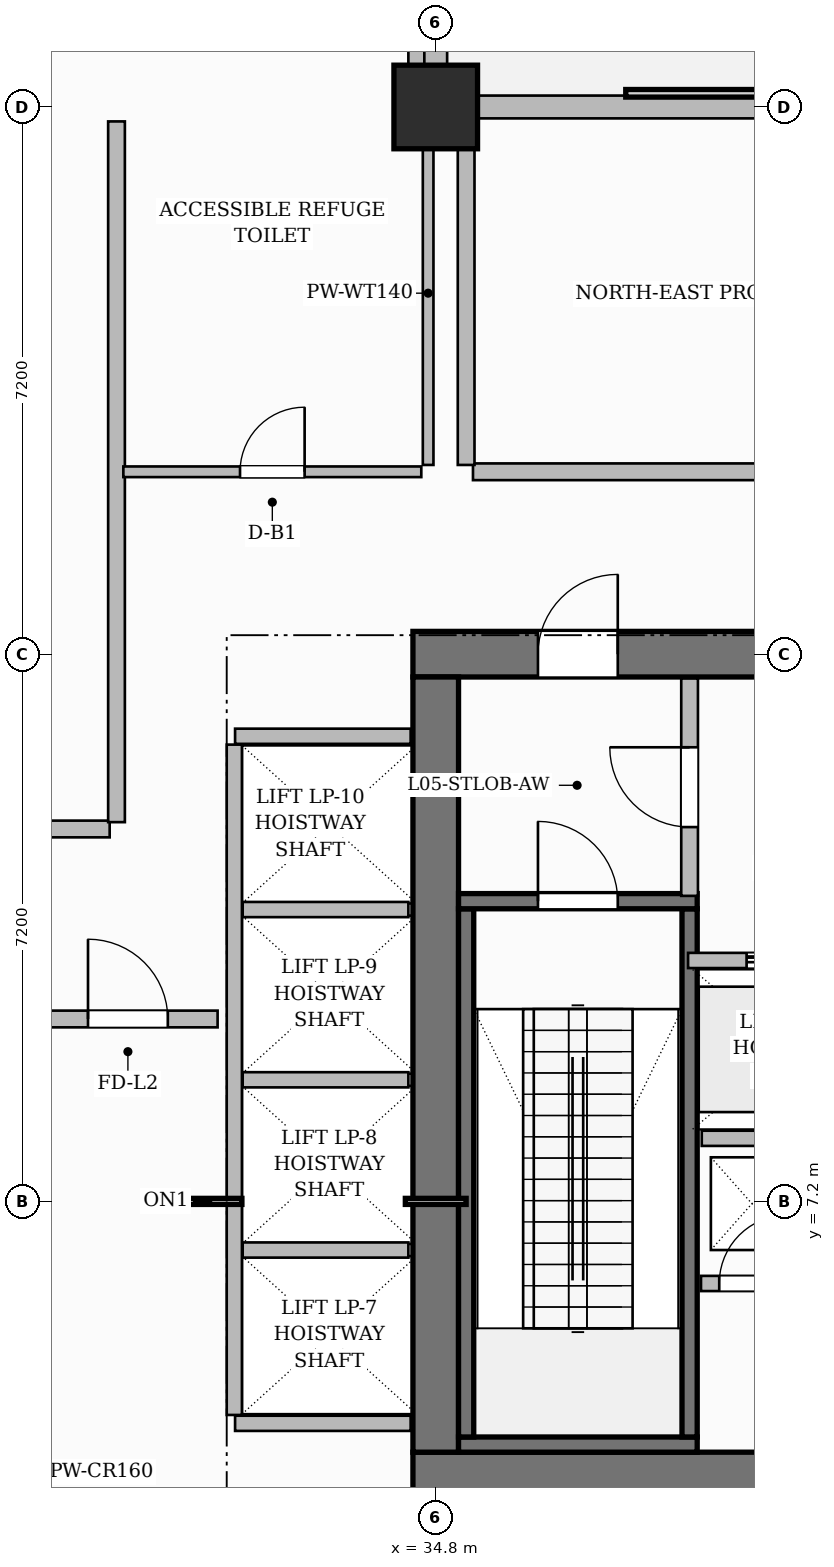
"""IFC4 building model, lengths in metres.
Left out: names, types, materials, properties, quantities, classifications, styles, units other than length and angle.
Written with IfcOpenShell. Run it as: python <this file> out.ifc"""

import sys

from ifc_helpers import new_model, si_unit, direction, frame, frame_2d, origin, origin_2d, place, context, subcontext, project, spatial, rectangle, extrude, source, transform, mapped, element, fill, save


model = new_model("IFC4")
c1 = context("Model", 3, precision=1e-05, world=origin(), true_north=direction((0.0, 1.0)))
c2 = subcontext(c1, "Body", "Model", "MODEL_VIEW")
j1 = project(units=[si_unit("LENGTHUNIT", "METRE"), si_unit("PLANEANGLEUNIT", "RADIAN")], contexts=[c1])
p1 = place(None, origin())
s1 = spatial("IfcSite", under=j1, at=p1, CompositionType="ELEMENT")
p2 = place(p1, origin())
s2 = spatial("IfcBuilding", under=s1, at=p2, CompositionType="ELEMENT")
p3 = place(p2, frame((0.0, 0.0, 27.0)))
s3 = spatial("IfcBuildingStorey", under=s2, at=p3, CompositionType="ELEMENT", Elevation=27.0)
p4 = place(p3, frame((34.5, 3.6, 0.0), z_axis=(0.0, 0.0, 1.0), x_axis=(1.0, 0.0, 0.0)))
e1 = element("IfcWall", 1, at=p4, inside=s3, PredefinedType="SHEAR", context=c2, shape_type="SweptSolid", body=[
    extrude(rectangle(XDim=15.6, YDim=0.6, at=frame_2d((7.8, 0.0))), origin(), (0.0, 0.0, 1.0), 5.4),
])
p5 = place(p4, frame((4.85, 0.0, 0.0)))
e2 = element("IfcOpeningElement", 2, at=p5, cuts=e1, PredefinedType="OPENING", context=c2, shape_type="SweptSolid", body=[
    extrude(rectangle(XDim=0.9, YDim=2.1, at=frame_2d((0.45, 1.05))), frame((0.0, 0.31, 0.0), z_axis=(0.0, -1.0, 0.0), x_axis=(1.0, 0.0, 0.0)), (0.0, 0.0, 1.0), 0.62),
])
p6 = place(p4, frame((7.27, 0.0, 0.0)))
e3 = element("IfcOpeningElement", 3, at=p6, cuts=e1, PredefinedType="OPENING", context=c2, shape_type="SweptSolid", body=[
    extrude(rectangle(XDim=0.9, YDim=2.1, at=frame_2d((0.45, 1.05))), frame((0.0, 0.31, 0.0), z_axis=(0.0, -1.0, 0.0), x_axis=(1.0, 0.0, 0.0)), (0.0, 0.0, 1.0), 0.62),
])
p7 = place(p3, frame((34.5, 14.4, 0.0), z_axis=(0.0, 0.0, 1.0), x_axis=(1.0, 0.0, 0.0)))
e4 = element("IfcWall", 4, at=p7, inside=s3, PredefinedType="SHEAR", context=c2, shape_type="SweptSolid", body=[
    extrude(rectangle(XDim=15.6, YDim=0.6, at=frame_2d((7.8, 0.0))), origin(), (0.0, 0.0, 1.0), 5.4),
])
p8 = place(p7, frame((5.43, 0.0, 0.0)))
e5 = element("IfcOpeningElement", 5, at=p8, cuts=e4, PredefinedType="OPENING", context=c2, shape_type="SweptSolid", body=[
    extrude(rectangle(XDim=1.5, YDim=2.2, at=frame_2d((0.75, 1.1))), frame((0.0, 0.31, 0.0), z_axis=(0.0, -1.0, 0.0), x_axis=(1.0, 0.0, 0.0)), (0.0, 0.0, 1.0), 0.62),
])
p9 = place(p7, frame((1.645, 0.0, 0.0)))
e6 = element("IfcOpeningElement", 6, at=p9, cuts=e4, PredefinedType="OPENING", context=c2, shape_type="SweptSolid", body=[
    extrude(rectangle(XDim=1.05, YDim=2.15, at=frame_2d((0.525, 1.075))), frame((0.0, 0.31, 0.0), z_axis=(0.0, -1.0, 0.0), x_axis=(1.0, 0.0, 0.0)), (0.0, 0.0, 1.0), 0.62),
])
p10 = place(p7, frame((11.275, 0.0, 0.0)))
e7 = element("IfcOpeningElement", 7, at=p10, cuts=e4, PredefinedType="OPENING", context=c2, shape_type="SweptSolid", body=[
    extrude(rectangle(XDim=1.05, YDim=2.15, at=frame_2d((0.525, 1.075))), frame((0.0, 0.31, 0.0), z_axis=(0.0, -1.0, 0.0), x_axis=(1.0, 0.0, 0.0)), (0.0, 0.0, 1.0), 0.62),
])
p11 = place(p3, frame((34.8, 3.9, 0.0), z_axis=(0.0, 0.0, 1.0), x_axis=(0.0, 1.0, 0.0)))
e8 = element("IfcWall", 8, at=p11, inside=s3, PredefinedType="SHEAR", context=c2, shape_type="SweptSolid", body=[
    extrude(rectangle(XDim=10.2, YDim=0.6, at=frame_2d((5.1, 0.0))), origin(), (0.0, 0.0, 1.0), 5.4),
])
m1 = source(origin(), c2, "Body", "SweptSolid", [
    extrude(rectangle(XDim=1.1, YDim=1.1, at=origin_2d()), origin(), (0.0, 0.0, 1.0), 5.4),
])
p12 = place(p3, frame((34.8, 21.6, 0.0), z_axis=(0.0, 0.0, 1.0), x_axis=(1.0, 0.0, 0.0)))
e9 = element("IfcColumn", 9, at=p12, inside=s3, PredefinedType="COLUMN", context=c2, shape_type="MappedRepresentation", body=[
    mapped(m1, transform((0.0, 0.0, 0.0), scale=1.0)),
])
p13 = place(p3, frame((35.1, 4.0, 0.0), z_axis=(0.0, 0.0, 1.0), x_axis=(1.0, 0.0, 0.0)))
e10 = element("IfcWall", 10, at=p13, inside=s3, PredefinedType="SHEAR", context=c2, shape_type="SweptSolid", body=[
    extrude(rectangle(XDim=3.14, YDim=0.2, at=frame_2d((1.57, 0.0))), origin(), (0.0, 0.0, 1.0), 5.4),
])
for number, where, z_axis, x_axis in (
    (11, (35.2, 4.1, 0.0), (0.0, 0.0, 1.0), (0.0, 1.0, 0.0)),
    (12, (38.14, 4.1, 0.0), (0.0, 0.0, 1.0), (0.0, 1.0, 0.0)),
):
    element("IfcWall", number, at=place(p3, frame(where, z_axis=z_axis, x_axis=x_axis)), inside=s3, PredefinedType="SHEAR", context=c2, shape_type="SweptSolid", body=[
        extrude(rectangle(XDim=6.95, YDim=0.2, at=frame_2d((3.475, 0.0))), origin(), (0.0, 0.0, 1.0), 5.4),
    ])
p14 = place(p3, frame((35.1, 11.15, 0.0), z_axis=(0.0, 0.0, 1.0), x_axis=(1.0, 0.0, 0.0)))
e13 = element("IfcWall", 13, at=p14, inside=s3, PredefinedType="SHEAR", context=c2, shape_type="SweptSolid", body=[
    extrude(rectangle(XDim=3.14, YDim=0.2, at=frame_2d((1.57, 0.0))), origin(), (0.0, 0.0, 1.0), 5.4),
])
p15 = place(p14, frame((1.045, 0.0, 0.0)))
e14 = element("IfcOpeningElement", 14, at=p15, cuts=e13, PredefinedType="OPENING", context=c2, shape_type="SweptSolid", body=[
    extrude(rectangle(XDim=1.05, YDim=2.2, at=frame_2d((0.525, 1.1))), frame((0.0, 0.11, 0.0), z_axis=(0.0, -1.0, 0.0), x_axis=(1.0, 0.0, 0.0)), (0.0, 0.0, 1.0), 0.22),
])
p16 = place(p3, frame((38.3, 8.03, 0.0), z_axis=(0.0, 0.0, 1.0), x_axis=(1.0, 0.0, 0.0)))
e15 = element("IfcWall", 15, at=p16, inside=s3, PredefinedType="PARTITIONING", context=c2, shape_type="SweptSolid", body=[
    extrude(rectangle(XDim=4.74, YDim=0.2, at=frame_2d((2.37, 0.0))), origin(), (0.0, 0.0, 1.0), 5.15),
])
p17 = place(p3, frame((38.14, 11.22, 0.0), z_axis=(0.0, 0.0, 1.0), x_axis=(0.0, 1.0, 0.0)))
e16 = element("IfcWall", 16, at=p17, inside=s3, PredefinedType="PARTITIONING", context=c2, shape_type="SweptSolid", body=[
    extrude(rectangle(XDim=2.86, YDim=0.22, at=frame_2d((1.43, 0.0))), origin(), (0.0, 0.0, 1.0), 5.15),
])
p18 = place(p17, frame((0.905, 0.0, 0.0)))
e17 = element("IfcOpeningElement", 17, at=p18, cuts=e16, PredefinedType="OPENING", context=c2, shape_type="SweptSolid", body=[
    extrude(rectangle(XDim=1.05, YDim=2.15, at=frame_2d((0.525, 1.075))), frame((0.0, 0.12, 0.0), z_axis=(0.0, -1.0, 0.0), x_axis=(1.0, 0.0, 0.0)), (0.0, 0.0, 1.0), 0.24),
])
p19 = place(p3, frame((38.29, 6.12, 0.0), z_axis=(0.0, 0.0, 1.0), x_axis=(1.0, 0.0, 0.0)))
e18 = element("IfcWall", 18, at=p19, inside=s3, PredefinedType="PARTITIONING", context=c2, shape_type="SweptSolid", body=[
    extrude(rectangle(XDim=1.38, YDim=0.2, at=frame_2d((0.69, 0.0))), origin(), (0.0, 0.0, 1.0), 5.15),
])
p20 = place(p19, frame((0.24, 0.0, 0.0)))
e19 = element("IfcOpeningElement", 19, at=p20, cuts=e18, PredefinedType="OPENING", context=c2, shape_type="SweptSolid", body=[
    extrude(rectangle(XDim=0.9, YDim=2.1, at=frame_2d((0.45, 1.05))), frame((0.0, 0.11, 0.0), z_axis=(0.0, -1.0, 0.0), x_axis=(1.0, 0.0, 0.0)), (0.0, 0.0, 1.0), 0.22),
])
for number, where, z_axis, x_axis in (
    (20, (32.16, 4.28, 0.0), (0.0, 0.0, 1.0), (1.0, 0.0, 0.0)),
    (21, (32.16, 13.32, 0.0), (0.0, 0.0, 1.0), (1.0, 0.0, 0.0)),
):
    element("IfcWall", number, at=place(p3, frame(where, z_axis=z_axis, x_axis=x_axis)), inside=s3, PredefinedType="PARTITIONING", context=c2, shape_type="SweptSolid", body=[
        extrude(rectangle(XDim=2.31, YDim=0.2, at=frame_2d((1.155, 0.0))), origin(), (0.0, 0.0, 1.0), 5.15),
    ])
p21 = place(p3, frame((32.15, 4.39, 0.0), z_axis=(0.0, 0.0, 1.0), x_axis=(0.0, 1.0, 0.0)))
e22 = element("IfcWall", 22, at=p21, inside=s3, PredefinedType="PARTITIONING", context=c2, shape_type="SweptSolid", body=[
    extrude(rectangle(XDim=8.82, YDim=0.2, at=frame_2d((4.41, 0.0))), origin(), (0.0, 0.0, 1.0), 5.15),
])
for number, where, z_axis, x_axis in (
    (23, (32.26, 6.56, 0.0), (0.0, 0.0, 1.0), (1.0, 0.0, 0.0)),
    (24, (32.26, 8.8, 0.0), (0.0, 0.0, 1.0), (1.0, 0.0, 0.0)),
    (25, (32.26, 11.04, 0.0), (0.0, 0.0, 1.0), (1.0, 0.0, 0.0)),
):
    element("IfcWall", number, at=place(p3, frame(where, z_axis=z_axis, x_axis=x_axis)), inside=s3, PredefinedType="PARTITIONING", context=c2, shape_type="SweptSolid", body=[
        extrude(rectangle(XDim=2.18, YDim=0.2, at=frame_2d((1.09, 0.0))), origin(), (0.0, 0.0, 1.0), 5.15),
    ])
p22 = place(p3, frame((14.558, 9.6, 0.0), z_axis=(0.0, 0.0, 1.0), x_axis=(1.0, 0.0, 0.0)))
e26 = element("IfcWall", 26, at=p22, inside=s3, PredefinedType="PARTITIONING", context=c2, shape_type="SweptSolid", body=[
    extrude(rectangle(XDim=17.372, YDim=0.22, at=frame_2d((8.686, 0.0))), origin(), (0.0, 0.0, 1.0), 5.15),
])
p23 = place(p22, frame((15.667, 0.0, 0.0)))
e27 = element("IfcOpeningElement", 27, at=p23, cuts=e26, PredefinedType="OPENING", context=c2, shape_type="SweptSolid", body=[
    extrude(rectangle(XDim=1.05, YDim=2.15, at=frame_2d((0.525, 1.075))), frame((0.0, 0.12, 0.0), z_axis=(0.0, -1.0, 0.0), x_axis=(1.0, 0.0, 0.0)), (0.0, 0.0, 1.0), 0.24),
])
p24 = place(p22, frame((8.192, 0.0, 0.0)))
e28 = element("IfcOpeningElement", 28, at=p24, cuts=e26, PredefinedType="OPENING", context=c2, shape_type="SweptSolid", body=[
    extrude(rectangle(XDim=1.5, YDim=2.2, at=frame_2d((0.75, 1.1))), frame((0.0, 0.12, 0.0), z_axis=(0.0, -1.0, 0.0), x_axis=(1.0, 0.0, 0.0)), (0.0, 0.0, 1.0), 0.24),
])
p25 = place(p3, frame((18.09, 12.1, 0.0), z_axis=(0.0, 0.0, 1.0), x_axis=(1.0, 0.0, 0.0)))
e29 = element("IfcWall", 29, at=p25, inside=s3, PredefinedType="PARTITIONING", context=c2, shape_type="SweptSolid", body=[
    extrude(rectangle(XDim=12.42, YDim=0.22, at=frame_2d((6.21, 0.0))), origin(), (0.0, 0.0, 1.0), 5.15),
])
p26 = place(p25, frame((1.56, 0.0, 0.0)))
e30 = element("IfcOpeningElement", 30, at=p26, cuts=e29, PredefinedType="OPENING", context=c2, shape_type="SweptSolid", body=[
    extrude(rectangle(XDim=1.5, YDim=2.2, at=frame_2d((0.75, 1.1))), frame((0.0, 0.12, 0.0), z_axis=(0.0, -1.0, 0.0), x_axis=(1.0, 0.0, 0.0)), (0.0, 0.0, 1.0), 0.24),
])
p27 = place(p25, frame((8.16, 0.0, 0.0)))
e31 = element("IfcOpeningElement", 31, at=p27, cuts=e29, PredefinedType="OPENING", context=c2, shape_type="SweptSolid", body=[
    extrude(rectangle(XDim=1.5, YDim=2.2, at=frame_2d((0.75, 1.1))), frame((0.0, 0.12, 0.0), z_axis=(0.0, -1.0, 0.0), x_axis=(1.0, 0.0, 0.0)), (0.0, 0.0, 1.0), 0.24),
])
p28 = place(p3, frame((30.6, 12.19, 0.0), z_axis=(0.0, 0.0, 1.0), x_axis=(0.0, 1.0, 0.0)))
e32 = element("IfcWall", 32, at=p28, inside=s3, PredefinedType="PARTITIONING", context=c2, shape_type="SweptSolid", body=[
    extrude(rectangle(XDim=9.22, YDim=0.22, at=frame_2d((4.61, 0.0))), origin(), (0.0, 0.0, 1.0), 5.15),
])
p29 = place(p3, frame((30.69, 16.8, 0.0), z_axis=(0.0, 0.0, 1.0), x_axis=(1.0, 0.0, 0.0)))
e33 = element("IfcWall", 33, at=p29, inside=s3, PredefinedType="PARTITIONING", context=c2, shape_type="SweptSolid", body=[
    extrude(rectangle(XDim=3.92, YDim=0.14, at=frame_2d((1.96, 0.0))), origin(), (0.0, 0.0, 1.0), 5.15),
])
p30 = place(p29, frame((1.535, 0.0, 0.0)))
e34 = element("IfcOpeningElement", 34, at=p30, cuts=e33, PredefinedType="OPENING", context=c2, shape_type="SweptSolid", body=[
    extrude(rectangle(XDim=0.85, YDim=2.1, at=frame_2d((0.425, 1.05))), frame((0.0, 0.08, 0.0), z_axis=(0.0, -1.0, 0.0), x_axis=(1.0, 0.0, 0.0)), (0.0, 0.0, 1.0), 0.16),
])
p31 = place(p3, frame((34.7, 16.89, 0.0), z_axis=(0.0, 0.0, 1.0), x_axis=(0.0, 1.0, 0.0)))
e35 = element("IfcWall", 35, at=p31, inside=s3, PredefinedType="PARTITIONING", context=c2, shape_type="SweptSolid", body=[
    extrude(rectangle(XDim=4.52, YDim=0.14, at=frame_2d((2.26, 0.0))), origin(), (0.0, 0.0, 1.0), 4.485),
])
p32 = place(p3, frame((35.29, 16.8, 0.0), z_axis=(0.0, 0.0, 1.0), x_axis=(1.0, 0.0, 0.0)))
e36 = element("IfcWall", 36, at=p32, inside=s3, PredefinedType="PARTITIONING", context=c2, shape_type="SweptSolid", body=[
    extrude(rectangle(XDim=14.22, YDim=0.22, at=frame_2d((7.11, 0.0))), origin(), (0.0, 0.0, 1.0), 5.15),
])
p33 = place(p32, frame((4.76, 0.0, 0.0)))
e37 = element("IfcOpeningElement", 37, at=p33, cuts=e36, PredefinedType="OPENING", context=c2, shape_type="SweptSolid", body=[
    extrude(rectangle(XDim=1.5, YDim=2.2, at=frame_2d((0.75, 1.1))), frame((0.0, 0.12, 0.0), z_axis=(0.0, -1.0, 0.0), x_axis=(1.0, 0.0, 0.0)), (0.0, 0.0, 1.0), 0.24),
])
p34 = place(p3, frame((35.2, 16.89, 0.0), z_axis=(0.0, 0.0, 1.0), x_axis=(0.0, 1.0, 0.0)))
e38 = element("IfcWall", 38, at=p34, inside=s3, PredefinedType="PARTITIONING", context=c2, shape_type="SweptSolid", body=[
    extrude(rectangle(XDim=4.52, YDim=0.22, at=frame_2d((2.26, 0.0))), origin(), (0.0, 0.0, 1.0), 5.15),
])
p35 = place(p3, frame((34.55, 21.69, 0.0), z_axis=(0.0, 0.0, 1.0), x_axis=(0.0, 1.0, 0.0)))
e39 = element("IfcWall", 39, at=p35, inside=s3, PredefinedType="PARTITIONING", context=c2, shape_type="SweptSolid", body=[
    extrude(rectangle(XDim=10.47, YDim=0.22, at=frame_2d((5.235, 0.0))), origin(), (0.0, 0.0, 1.0), 4.485),
])
p36 = place(p3, frame((38.12, 10.37, 0.0), z_axis=(0.0, 0.0, 1.0), x_axis=(1.0, 0.0, 0.0)))
e40 = element("IfcWall", 40, at=p36, inside=s3, PredefinedType="PARTITIONING", context=c2, shape_type="SweptSolid", body=[
    extrude(rectangle(XDim=2.64, YDim=0.2, at=frame_2d((1.32, 0.0))), origin(), (0.0, 0.0, 1.0), 5.15),
])
p37 = place(p36, frame((0.77, 0.0, 0.0)))
e41 = element("IfcOpeningElement", 41, at=p37, cuts=e40, PredefinedType="OPENING", context=c2, shape_type="SweptSolid", body=[
    extrude(rectangle(XDim=1.1, YDim=2.2, at=frame_2d((0.55, 1.1))), frame((0.0, 0.11, 0.0), z_axis=(0.0, -1.0, 0.0), x_axis=(1.0, 0.0, 0.0)), (0.0, 0.0, 1.0), 0.22),
])
p38 = place(p3, frame((34.8, 21.6, 0.0), z_axis=(0.0, 0.0, 1.0), x_axis=(1.0, 0.0, 0.0)))
e42 = element("IfcWall", 42, at=p38, inside=s3, PredefinedType="SOLIDWALL", context=c2, shape_type="SweptSolid", body=[
    extrude(rectangle(XDim=22.8, YDim=0.3, at=frame_2d((11.4, 0.0))), origin(), (0.0, 0.0, 1.0), 4.485),
])
p39 = place(p3, frame((34.8, 21.65, 0.0), z_axis=(0.0, 0.0, 1.0), x_axis=(0.0, 1.0, 0.0)))
e43 = element("IfcWall", 43, at=p39, inside=s3, PredefinedType="SOLIDWALL", context=c2, shape_type="SweptSolid", body=[
    extrude(rectangle(XDim=10.75, YDim=0.3, at=frame_2d((5.375, 0.0))), origin(), (0.0, 0.0, 1.0), 4.485),
])
m2 = source(origin(), c2, "Body", "SweptSolid", [
    extrude(rectangle(XDim=1.05, YDim=2.2, at=frame_2d((0.525, 1.1))), frame((0.0, 0.025, 0.0), z_axis=(0.0, -1.0, 0.0), x_axis=(1.0, 0.0, 0.0)), (0.0, 0.0, 1.0), 0.05),
])
p40 = place(p15, origin())
e44 = element("IfcDoor", 44, at=p40, inside=s3, OperationType="SINGLE_SWING_LEFT", PredefinedType="DOOR", context=c2, shape_type="MappedRepresentation", body=[
    mapped(m2, transform((0.0, 0.0, 0.0), scale=1.0)),
])
fill(e14, e44)
m3 = source(origin(), c2, "Body", "SweptSolid", [
    extrude(rectangle(XDim=1.05, YDim=2.15, at=frame_2d((0.525, 1.075))), frame((0.0, 0.025, 0.0), z_axis=(0.0, -1.0, 0.0), x_axis=(1.0, 0.0, 0.0)), (0.0, 0.0, 1.0), 0.05),
])
p41 = place(p18, origin())
e45 = element("IfcDoor", 45, at=p41, inside=s3, OperationType="SINGLE_SWING_RIGHT", PredefinedType="DOOR", context=c2, shape_type="MappedRepresentation", body=[
    mapped(m3, transform((0.0, 0.0, 0.0), scale=1.0)),
])
fill(e17, e45)
p42 = place(p9, origin())
e46 = element("IfcDoor", 46, at=p42, inside=s3, OperationType="SINGLE_SWING_RIGHT", PredefinedType="DOOR", context=c2, shape_type="MappedRepresentation", body=[
    mapped(m3, transform((0.0, 0.0, 0.0), scale=1.0)),
])
fill(e6, e46)
m4 = source(origin(), c2, "Body", "SweptSolid", [
    extrude(rectangle(XDim=0.9, YDim=2.1, at=frame_2d((0.45, 1.05))), frame((0.0, 0.025, 0.0), z_axis=(0.0, -1.0, 0.0), x_axis=(1.0, 0.0, 0.0)), (0.0, 0.0, 1.0), 0.05),
])
p43 = place(p20, origin())
e47 = element("IfcDoor", 47, at=p43, inside=s3, OperationType="SINGLE_SWING_RIGHT", PredefinedType="DOOR", context=c2, shape_type="MappedRepresentation", body=[
    mapped(m4, transform((0.0, 0.0, 0.0), scale=1.0)),
])
fill(e19, e47)
p44 = place(p23, origin())
e48 = element("IfcDoor", 48, at=p44, inside=s3, OperationType="SINGLE_SWING_LEFT", PredefinedType="DOOR", context=c2, shape_type="MappedRepresentation", body=[
    mapped(m3, transform((0.0, 0.0, 0.0), scale=1.0)),
])
fill(e27, e48)
m5 = source(origin(), c2, "Body", "SweptSolid", [
    extrude(rectangle(XDim=0.85, YDim=2.1, at=frame_2d((0.425, 1.05))), frame((0.0, 0.025, 0.0), z_axis=(0.0, -1.0, 0.0), x_axis=(1.0, 0.0, 0.0)), (0.0, 0.0, 1.0), 0.05),
])
p45 = place(p30, origin())
e49 = element("IfcDoor", 49, at=p45, inside=s3, OperationType="SINGLE_SWING_RIGHT", PredefinedType="DOOR", context=c2, shape_type="MappedRepresentation", body=[
    mapped(m5, transform((0.0, 0.0, 0.0), scale=1.0)),
])
fill(e34, e49)
m6 = source(origin(), c2, "Body", "SweptSolid", [
    extrude(rectangle(XDim=1.1, YDim=2.2, at=frame_2d((0.55, 1.1))), frame((0.0, 0.025, 0.0), z_axis=(0.0, -1.0, 0.0), x_axis=(1.0, 0.0, 0.0)), (0.0, 0.0, 1.0), 0.05),
])
p46 = place(p37, origin())
e50 = element("IfcDoor", 50, at=p46, inside=s3, OperationType="SLIDING_TO_LEFT", PredefinedType="DOOR", context=c2, shape_type="MappedRepresentation", body=[
    mapped(m6, transform((0.0, 0.0, 0.0), scale=1.0)),
])
fill(e41, e50)
save(model, sys.argv[1])
